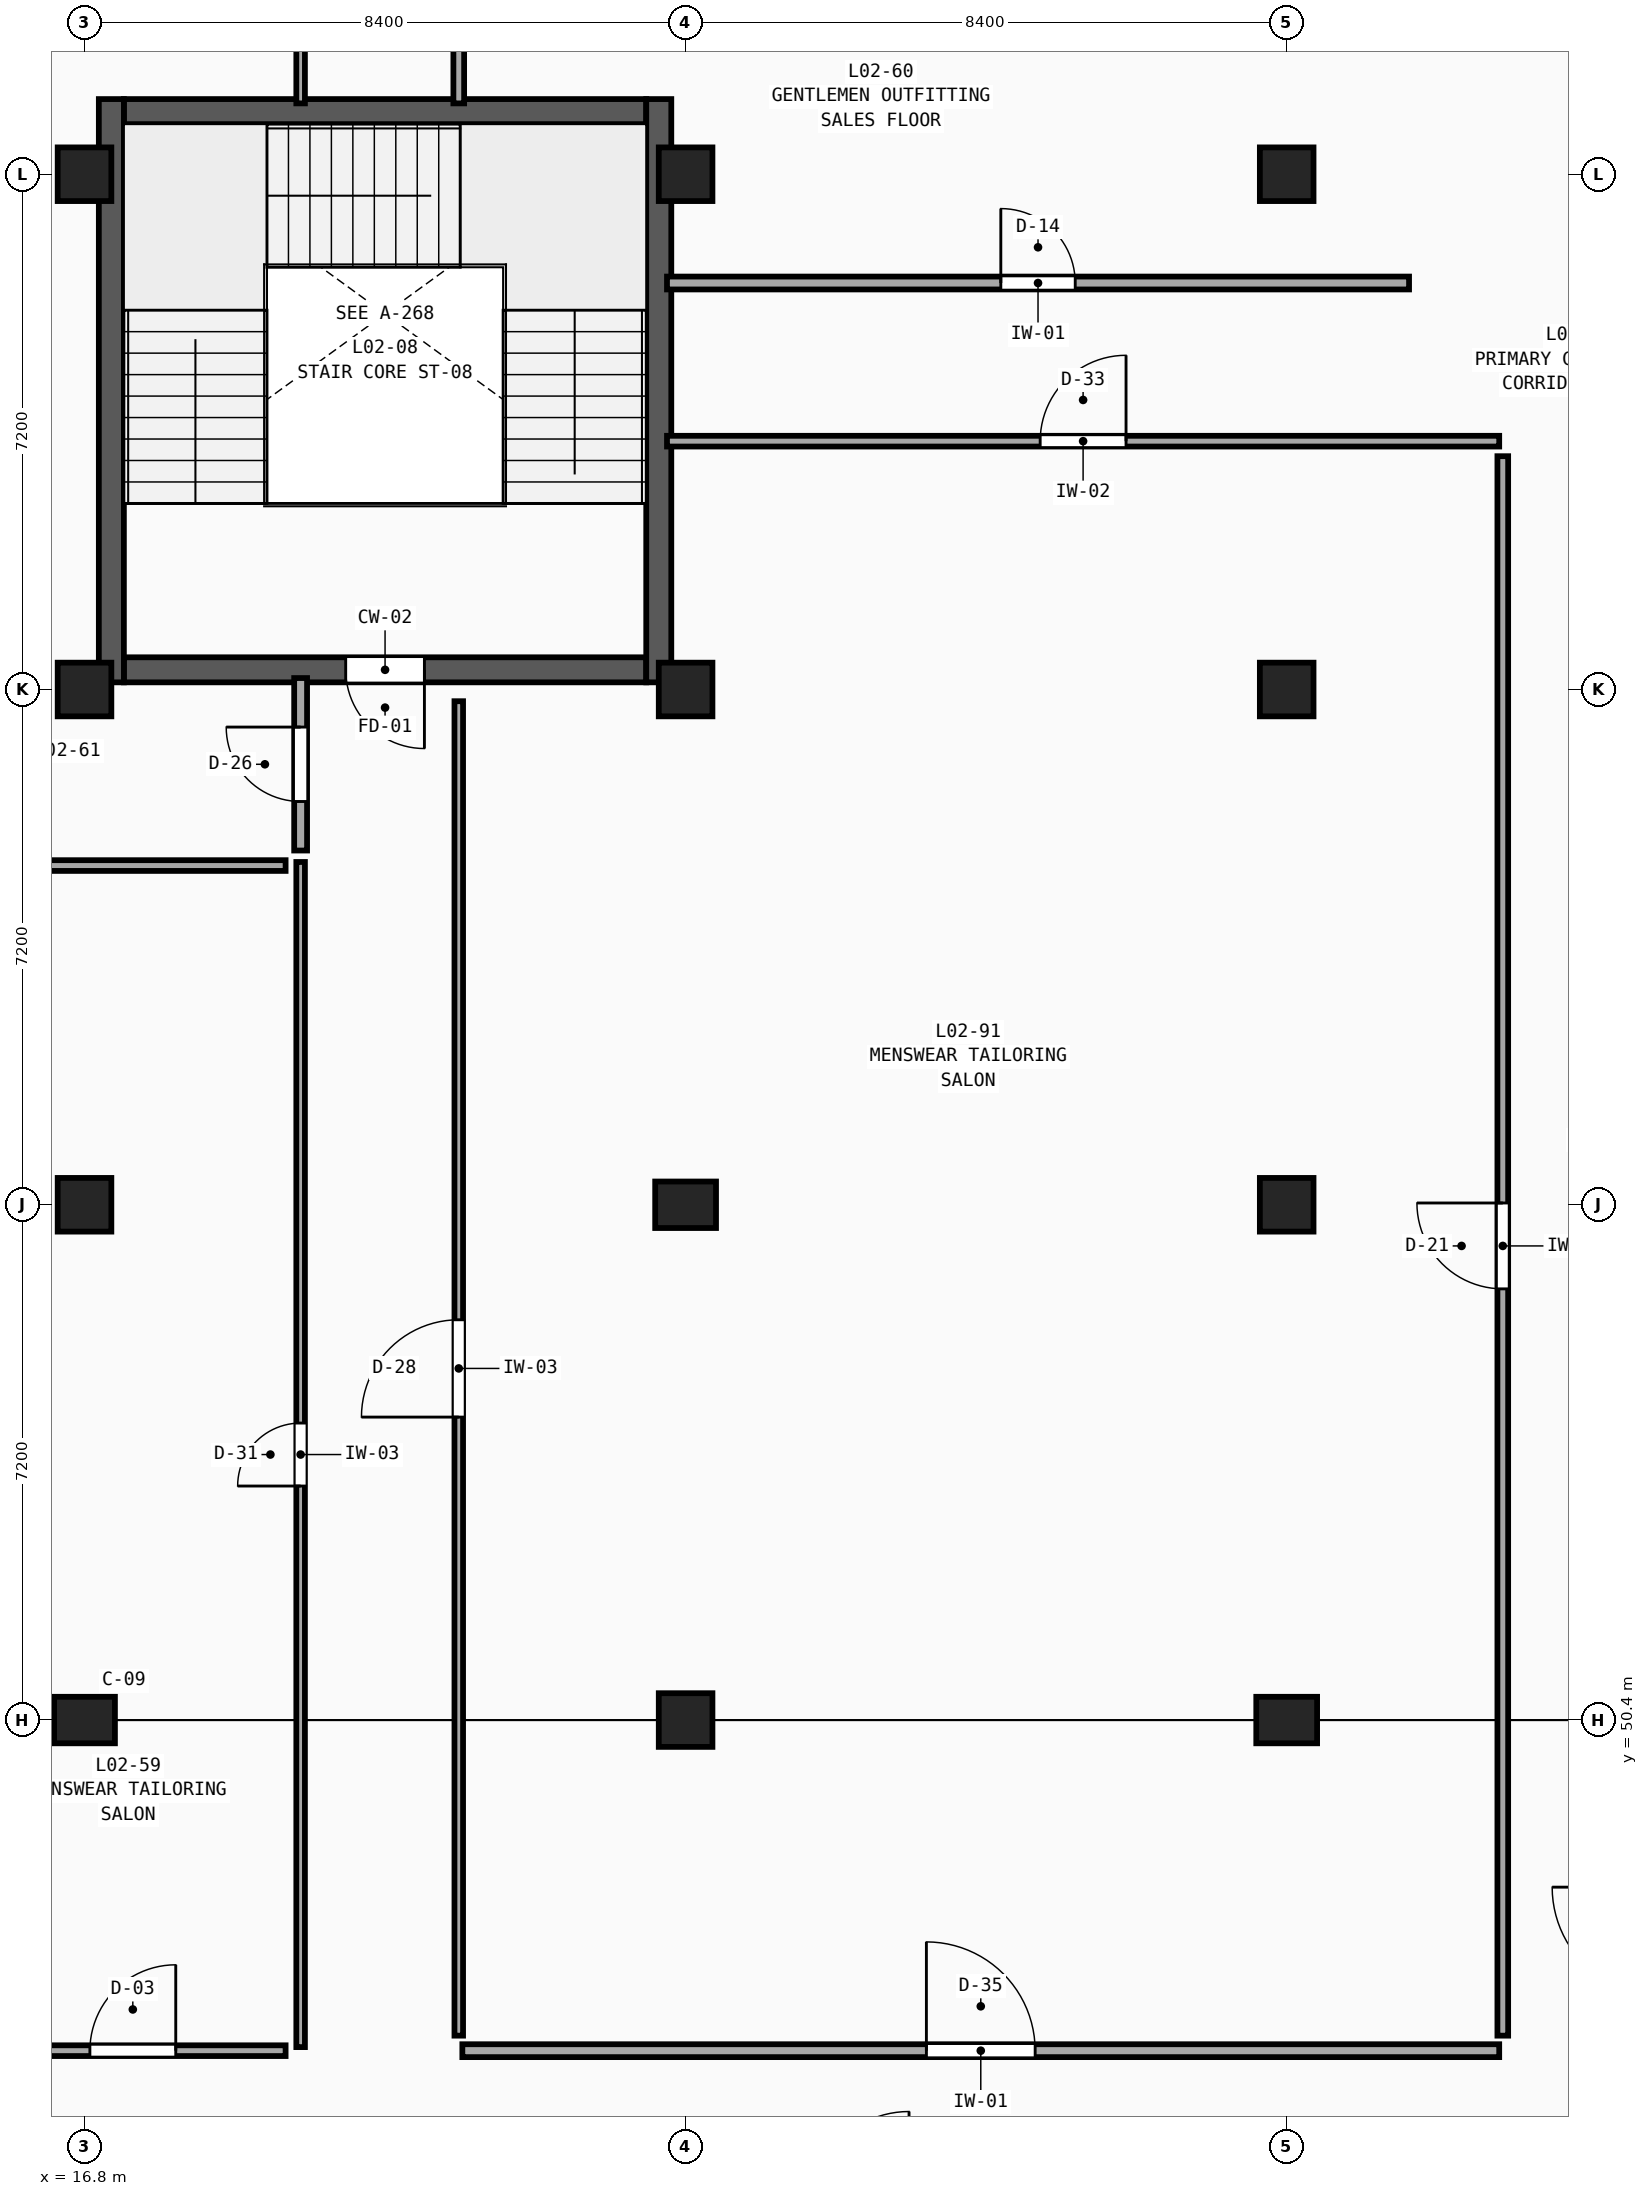
"""IFC4 building model, lengths in metres.
Left out: names, types, materials, properties, quantities, classifications, styles, units other than length and angle.
Written with IfcOpenShell. Run it as: python <this file> out.ifc"""

import sys

from ifc_helpers import new_model, si_unit, direction, frame, frame_2d, origin, origin_2d, place, context, subcontext, project, spatial, rectangle, extrude, element, fill, save


model = new_model("IFC4")
c1 = context("Model", 3, precision=1e-05, world=origin(), true_north=direction((0.0, 1.0)))
c2 = subcontext(c1, "Body", "Model", "MODEL_VIEW")
j1 = project(units=[si_unit("LENGTHUNIT", "METRE"), si_unit("PLANEANGLEUNIT", "RADIAN")], contexts=[c1])
p1 = place(None, origin())
s1 = spatial("IfcSite", under=j1, at=p1, CompositionType="ELEMENT")
p2 = place(p1, origin())
s2 = spatial("IfcBuilding", under=s1, at=p2, CompositionType="ELEMENT")
p3 = place(p2, frame((0.0, 0.0, 9.9)))
s3 = spatial("IfcBuildingStorey", under=s2, at=p3, CompositionType="ELEMENT", Elevation=9.9)
p4 = place(p3, frame((16.8, 50.4, 0.0), z_axis=(0.0, 0.0, 1.0), x_axis=(1.0, 0.0, 0.0)))
e1 = element("IfcColumn", 1, at=p4, inside=s3, PredefinedType="COLUMN", context=c2, shape_type="SweptSolid", body=[
    extrude(rectangle(XDim=0.85, YDim=0.65, at=origin_2d()), origin(), (0.0, 0.0, 1.0), 4.5),
])
for number, where, z_axis, x_axis in (
    (2, (16.8, 57.6, 0.0), (0.0, 0.0, 1.0), (1.0, 0.0, 0.0)),
    (3, (16.8, 64.8, 0.0), (0.0, 0.0, 1.0), (1.0, 0.0, 0.0)),
    (4, (16.8, 72.0, 0.0), (0.0, 0.0, 1.0), (1.0, 0.0, 0.0)),
    (5, (25.2, 50.4, 0.0), (0.0, 0.0, 1.0), (1.0, 0.0, 0.0)),
):
    element("IfcColumn", number, at=place(p3, frame(where, z_axis=z_axis, x_axis=x_axis)), inside=s3, PredefinedType="COLUMN", context=c2, shape_type="SweptSolid", body=[
        extrude(rectangle(XDim=0.75, YDim=0.75, at=origin_2d()), origin(), (0.0, 0.0, 1.0), 4.5),
    ])
p5 = place(p3, frame((25.2, 57.6, 0.0), z_axis=(0.0, 0.0, 1.0), x_axis=(1.0, 0.0, 0.0)))
e6 = element("IfcColumn", 6, at=p5, inside=s3, PredefinedType="COLUMN", context=c2, shape_type="SweptSolid", body=[
    extrude(rectangle(XDim=0.85, YDim=0.65, at=origin_2d()), origin(), (0.0, 0.0, 1.0), 4.5),
])
for number, where, z_axis, x_axis in (
    (7, (25.2, 64.8, 0.0), (0.0, 0.0, 1.0), (1.0, 0.0, 0.0)),
    (8, (25.2, 72.0, 0.0), (0.0, 0.0, 1.0), (1.0, 0.0, 0.0)),
):
    element("IfcColumn", number, at=place(p3, frame(where, z_axis=z_axis, x_axis=x_axis)), inside=s3, PredefinedType="COLUMN", context=c2, shape_type="SweptSolid", body=[
        extrude(rectangle(XDim=0.75, YDim=0.75, at=origin_2d()), origin(), (0.0, 0.0, 1.0), 4.5),
    ])
p6 = place(p3, frame((33.6, 50.4, 0.0), z_axis=(0.0, 0.0, 1.0), x_axis=(1.0, 0.0, 0.0)))
e9 = element("IfcColumn", 9, at=p6, inside=s3, PredefinedType="COLUMN", context=c2, shape_type="SweptSolid", body=[
    extrude(rectangle(XDim=0.85, YDim=0.65, at=origin_2d()), origin(), (0.0, 0.0, 1.0), 4.5),
])
for number, where, z_axis, x_axis in (
    (10, (33.6, 57.6, 0.0), (0.0, 0.0, 1.0), (1.0, 0.0, 0.0)),
    (11, (33.6, 64.8, 0.0), (0.0, 0.0, 1.0), (1.0, 0.0, 0.0)),
    (12, (33.6, 72.0, 0.0), (0.0, 0.0, 1.0), (1.0, 0.0, 0.0)),
):
    element("IfcColumn", number, at=place(p3, frame(where, z_axis=z_axis, x_axis=x_axis)), inside=s3, PredefinedType="COLUMN", context=c2, shape_type="SweptSolid", body=[
        extrude(rectangle(XDim=0.75, YDim=0.75, at=origin_2d()), origin(), (0.0, 0.0, 1.0), 4.5),
    ])
p7 = place(p3, frame((24.65, 65.075, 0.0), z_axis=(0.0, 0.0, 1.0), x_axis=(-1.0, 0.0, 0.0)))
e13 = element("IfcWall", 13, at=p7, inside=s3, PredefinedType="SHEAR", context=c2, shape_type="SweptSolid", body=[
    extrude(rectangle(XDim=7.3, YDim=0.35, at=frame_2d((3.65, 0.0))), origin(), (0.0, 0.0, 1.0), 4.5),
])
p8 = place(p7, frame((3.1, 0.0, 0.0)))
e14 = element("IfcOpeningElement", 14, at=p8, cuts=e13, PredefinedType="OPENING", context=c2, shape_type="SweptSolid", body=[
    extrude(rectangle(XDim=1.1, YDim=2.2, at=frame_2d((0.55, 1.1))), frame((0.0, 0.195, 0.0), z_axis=(0.0, -1.0, 0.0), x_axis=(1.0, 0.0, 0.0)), (0.0, 0.0, 1.0), 0.39),
])
p9 = place(p3, frame((17.35, 72.875, 0.0), z_axis=(0.0, 0.0, 1.0), x_axis=(1.0, 0.0, 0.0)))
e15 = element("IfcWall", 15, at=p9, inside=s3, PredefinedType="SHEAR", context=c2, shape_type="SweptSolid", body=[
    extrude(rectangle(XDim=7.3, YDim=0.35, at=frame_2d((3.65, 0.0))), origin(), (0.0, 0.0, 1.0), 4.5),
])
for number, where, z_axis, x_axis in (
    (16, (17.175, 73.05, 0.0), (0.0, 0.0, 1.0), (0.0, -1.0, 0.0)),
    (17, (24.825, 64.9, 0.0), (0.0, 0.0, 1.0), (0.0, 1.0, 0.0)),
):
    element("IfcWall", number, at=place(p3, frame(where, z_axis=z_axis, x_axis=x_axis)), inside=s3, PredefinedType="SHEAR", context=c2, shape_type="SweptSolid", body=[
        extrude(rectangle(XDim=8.15, YDim=0.35, at=frame_2d((4.075, 0.0))), origin(), (0.0, 0.0, 1.0), 4.5),
    ])
p10 = place(p3, frame((36.62, 45.99, 0.0), z_axis=(0.0, 0.0, 1.0), x_axis=(0.0, 1.0, 0.0)))
e18 = element("IfcWall", 18, at=p10, inside=s3, PredefinedType="PARTITIONING", context=c2, shape_type="SweptSolid", body=[
    extrude(rectangle(XDim=22.07, YDim=0.15, at=frame_2d((11.035, 0.0))), origin(), (0.0, 0.0, 1.0), 4.18),
])
p11 = place(p10, frame((10.435, 0.0, 0.0)))
e19 = element("IfcOpeningElement", 19, at=p11, cuts=e18, PredefinedType="OPENING", context=c2, shape_type="SweptSolid", body=[
    extrude(rectangle(XDim=1.2, YDim=2.29, at=frame_2d((0.6, 1.145))), frame((0.0, 0.095, 0.0), z_axis=(0.0, -1.0, 0.0), x_axis=(1.0, 0.0, 0.0)), (0.0, 0.0, 1.0), 0.19),
])
p12 = place(p3, frame((22.03, 45.99, 0.0), z_axis=(0.0, 0.0, 1.0), x_axis=(0.0, 1.0, 0.0)))
e20 = element("IfcWall", 20, at=p12, inside=s3, PredefinedType="PARTITIONING", context=c2, shape_type="SweptSolid", body=[
    extrude(rectangle(XDim=18.646, YDim=0.12, at=frame_2d((9.323, 0.0))), origin(), (0.0, 0.0, 1.0), 4.18),
])
p13 = place(p12, frame((8.643, 0.0, 0.0)))
e21 = element("IfcOpeningElement", 21, at=p13, cuts=e20, PredefinedType="OPENING", context=c2, shape_type="SweptSolid", body=[
    extrude(rectangle(XDim=1.36, YDim=2.37, at=frame_2d((0.68, 1.185))), frame((0.0, 0.08, 0.0), z_axis=(0.0, -1.0, 0.0), x_axis=(1.0, 0.0, 0.0)), (0.0, 0.0, 1.0), 0.16),
])
p14 = place(p3, frame((19.82, 45.83, 0.0), z_axis=(0.0, 0.0, 1.0), x_axis=(0.0, 1.0, 0.0)))
e22 = element("IfcWall", 22, at=p14, inside=s3, PredefinedType="PARTITIONING", context=c2, shape_type="SweptSolid", body=[
    extrude(rectangle(XDim=16.56, YDim=0.12, at=frame_2d((8.28, 0.0))), origin(), (0.0, 0.0, 1.0), 4.18),
])
p15 = place(p14, frame((7.84, 0.0, 0.0)))
e23 = element("IfcOpeningElement", 23, at=p15, cuts=e22, PredefinedType="OPENING", context=c2, shape_type="SweptSolid", body=[
    extrude(rectangle(XDim=0.88, YDim=2.45, at=frame_2d((0.44, 1.225))), frame((0.0, 0.08, 0.0), z_axis=(0.0, -1.0, 0.0), x_axis=(1.0, 0.0, 0.0)), (0.0, 0.0, 1.0), 0.16),
])
p16 = place(p3, frame((22.08, 45.78, 0.0), z_axis=(0.0, 0.0, 1.0), x_axis=(1.0, 0.0, 0.0)))
e24 = element("IfcWall", 24, at=p16, inside=s3, PredefinedType="PARTITIONING", context=c2, shape_type="SweptSolid", body=[
    extrude(rectangle(XDim=14.49, YDim=0.18, at=frame_2d((7.245, 0.0))), origin(), (0.0, 0.0, 1.0), 4.18),
])
p17 = place(p16, frame((6.485, 0.0, 0.0)))
e25 = element("IfcOpeningElement", 25, at=p17, cuts=e24, PredefinedType="OPENING", context=c2, shape_type="SweptSolid", body=[
    extrude(rectangle(XDim=1.52, YDim=2.45, at=frame_2d((0.76, 1.225))), frame((0.0, 0.11, 0.0), z_axis=(0.0, -1.0, 0.0), x_axis=(1.0, 0.0, 0.0)), (0.0, 0.0, 1.0), 0.22),
])
p18 = place(p3, frame((24.94, 68.27, 0.0), z_axis=(0.0, 0.0, 1.0), x_axis=(1.0, 0.0, 0.0)))
e26 = element("IfcWall", 26, at=p18, inside=s3, PredefinedType="PARTITIONING", context=c2, shape_type="SweptSolid", body=[
    extrude(rectangle(XDim=11.63, YDim=0.15, at=frame_2d((5.815, 0.0))), origin(), (0.0, 0.0, 1.0), 4.18),
])
p19 = place(p18, frame((5.215, 0.0, 0.0)))
e27 = element("IfcOpeningElement", 27, at=p19, cuts=e26, PredefinedType="OPENING", context=c2, shape_type="SweptSolid", body=[
    extrude(rectangle(XDim=1.2, YDim=2.45, at=frame_2d((0.6, 1.225))), frame((0.0, 0.095, 0.0), z_axis=(0.0, -1.0, 0.0), x_axis=(1.0, 0.0, 0.0)), (0.0, 0.0, 1.0), 0.19),
])
p20 = place(p3, frame((24.94, 70.48, 0.0), z_axis=(0.0, 0.0, 1.0), x_axis=(1.0, 0.0, 0.0)))
e28 = element("IfcWall", 28, at=p20, inside=s3, PredefinedType="PARTITIONING", context=c2, shape_type="SweptSolid", body=[
    extrude(rectangle(XDim=10.37, YDim=0.18, at=frame_2d((5.185, 0.0))), origin(), (0.0, 0.0, 1.0), 4.18),
])
p21 = place(p20, frame((4.665, 0.0, 0.0)))
e29 = element("IfcOpeningElement", 29, at=p21, cuts=e28, PredefinedType="OPENING", context=c2, shape_type="SweptSolid", body=[
    extrude(rectangle(XDim=1.04, YDim=2.21, at=frame_2d((0.52, 1.105))), frame((0.0, 0.11, 0.0), z_axis=(0.0, -1.0, 0.0), x_axis=(1.0, 0.0, 0.0)), (0.0, 0.0, 1.0), 0.22),
])
p22 = place(p3, frame((15.34, 45.78, 0.0), z_axis=(0.0, 0.0, 1.0), x_axis=(1.0, 0.0, 0.0)))
e30 = element("IfcWall", 30, at=p22, inside=s3, PredefinedType="PARTITIONING", context=c2, shape_type="SweptSolid", body=[
    extrude(rectangle(XDim=4.27, YDim=0.15, at=frame_2d((2.135, 0.0))), origin(), (0.0, 0.0, 1.0), 4.18),
])
p23 = place(p22, frame((1.535, 0.0, 0.0)))
e31 = element("IfcOpeningElement", 31, at=p23, cuts=e30, PredefinedType="OPENING", context=c2, shape_type="SweptSolid", body=[
    extrude(rectangle(XDim=1.2, YDim=2.05, at=frame_2d((0.6, 1.025))), frame((0.0, 0.095, 0.0), z_axis=(0.0, -1.0, 0.0), x_axis=(1.0, 0.0, 0.0)), (0.0, 0.0, 1.0), 0.19),
])
p24 = place(p3, frame((22.03, 72.99, 0.0), z_axis=(0.0, 0.0, 1.0), x_axis=(0.0, 1.0, 0.0)))
e32 = element("IfcWall", 32, at=p24, inside=s3, PredefinedType="PARTITIONING", context=c2, shape_type="SweptSolid", body=[
    extrude(rectangle(XDim=2.483, YDim=0.15, at=frame_2d((1.241, 0.0))), origin(), (0.0, 0.0, 1.0), 4.18),
])
p25 = place(p3, frame((19.82, 72.99, 0.0), z_axis=(0.0, 0.0, 1.0), x_axis=(0.0, 1.0, 0.0)))
e33 = element("IfcWall", 33, at=p25, inside=s3, PredefinedType="PARTITIONING", context=c2, shape_type="SweptSolid", body=[
    extrude(rectangle(XDim=2.483, YDim=0.12, at=frame_2d((1.241, 0.0))), origin(), (0.0, 0.0, 1.0), 4.18),
])
p26 = place(p25, frame((1.186, 0.0, 0.0)))
e34 = element("IfcOpeningElement", 34, at=p26, cuts=e33, PredefinedType="OPENING", context=c2, shape_type="SweptSolid", body=[
    extrude(rectangle(XDim=0.88, YDim=2.37, at=frame_2d((0.44, 1.185))), frame((0.0, 0.08, 0.0), z_axis=(0.0, -1.0, 0.0), x_axis=(1.0, 0.0, 0.0)), (0.0, 0.0, 1.0), 0.16),
])
p27 = place(p3, frame((19.82, 62.55, 0.0), z_axis=(0.0, 0.0, 1.0), x_axis=(0.0, 1.0, 0.0)))
e35 = element("IfcWall", 35, at=p27, inside=s3, PredefinedType="PARTITIONING", context=c2, shape_type="SweptSolid", body=[
    extrude(rectangle(XDim=2.41, YDim=0.18, at=frame_2d((1.205, 0.0))), origin(), (0.0, 0.0, 1.0), 4.18),
])
p28 = place(p27, frame((0.685, 0.0, 0.0)))
e36 = element("IfcOpeningElement", 36, at=p28, cuts=e35, PredefinedType="OPENING", context=c2, shape_type="SweptSolid", body=[
    extrude(rectangle(XDim=1.04, YDim=2.37, at=frame_2d((0.52, 1.185))), frame((0.0, 0.11, 0.0), z_axis=(0.0, -1.0, 0.0), x_axis=(1.0, 0.0, 0.0)), (0.0, 0.0, 1.0), 0.22),
])
p29 = place(p3, frame((15.34, 62.34, 0.0), z_axis=(0.0, 0.0, 1.0), x_axis=(1.0, 0.0, 0.0)))
e37 = element("IfcWall", 37, at=p29, inside=s3, PredefinedType="PARTITIONING", context=c2, shape_type="SweptSolid", body=[
    extrude(rectangle(XDim=4.27, YDim=0.15, at=frame_2d((2.135, 0.0))), origin(), (0.0, 0.0, 1.0), 4.18),
])
p30 = place(p8, origin())
e38 = element("IfcDoor", 38, at=p30, inside=s3, OperationType="SINGLE_SWING_LEFT", PredefinedType="DOOR", context=c2, shape_type="SweptSolid", body=[
    extrude(rectangle(XDim=1.1, YDim=2.2, at=frame_2d((0.55, 1.1))), frame((0.0, 0.025, 0.0), z_axis=(0.0, -1.0, 0.0), x_axis=(1.0, 0.0, 0.0)), (0.0, 0.0, 1.0), 0.05),
])
fill(e14, e38)
p31 = place(p11, origin())
e39 = element("IfcDoor", 39, at=p31, inside=s3, OperationType="SINGLE_SWING_RIGHT", PredefinedType="DOOR", context=c2, shape_type="SweptSolid", body=[
    extrude(rectangle(XDim=1.2, YDim=2.29, at=frame_2d((0.6, 1.145))), frame((0.0, 0.025, 0.0), z_axis=(0.0, -1.0, 0.0), x_axis=(1.0, 0.0, 0.0)), (0.0, 0.0, 1.0), 0.05),
])
fill(e19, e39)
p32 = place(p13, origin())
e40 = element("IfcDoor", 40, at=p32, inside=s3, OperationType="SINGLE_SWING_LEFT", PredefinedType="DOOR", context=c2, shape_type="SweptSolid", body=[
    extrude(rectangle(XDim=1.36, YDim=2.37, at=frame_2d((0.68, 1.185))), frame((0.0, 0.025, 0.0), z_axis=(0.0, -1.0, 0.0), x_axis=(1.0, 0.0, 0.0)), (0.0, 0.0, 1.0), 0.05),
])
fill(e21, e40)
p33 = place(p15, origin())
e41 = element("IfcDoor", 41, at=p33, inside=s3, OperationType="SINGLE_SWING_LEFT", PredefinedType="DOOR", context=c2, shape_type="SweptSolid", body=[
    extrude(rectangle(XDim=0.88, YDim=2.45, at=frame_2d((0.44, 1.225))), frame((0.0, 0.025, 0.0), z_axis=(0.0, -1.0, 0.0), x_axis=(1.0, 0.0, 0.0)), (0.0, 0.0, 1.0), 0.05),
])
fill(e23, e41)
p34 = place(p17, origin())
e42 = element("IfcDoor", 42, at=p34, inside=s3, OperationType="SINGLE_SWING_LEFT", PredefinedType="DOOR", context=c2, shape_type="SweptSolid", body=[
    extrude(rectangle(XDim=1.52, YDim=2.45, at=frame_2d((0.76, 1.225))), frame((0.0, 0.025, 0.0), z_axis=(0.0, -1.0, 0.0), x_axis=(1.0, 0.0, 0.0)), (0.0, 0.0, 1.0), 0.05),
])
fill(e25, e42)
p35 = place(p19, origin())
e43 = element("IfcDoor", 43, at=p35, inside=s3, OperationType="SINGLE_SWING_RIGHT", PredefinedType="DOOR", context=c2, shape_type="SweptSolid", body=[
    extrude(rectangle(XDim=1.2, YDim=2.45, at=frame_2d((0.6, 1.225))), frame((0.0, 0.025, 0.0), z_axis=(0.0, -1.0, 0.0), x_axis=(1.0, 0.0, 0.0)), (0.0, 0.0, 1.0), 0.05),
])
fill(e27, e43)
p36 = place(p21, origin())
e44 = element("IfcDoor", 44, at=p36, inside=s3, OperationType="SINGLE_SWING_LEFT", PredefinedType="DOOR", context=c2, shape_type="SweptSolid", body=[
    extrude(rectangle(XDim=1.04, YDim=2.21, at=frame_2d((0.52, 1.105))), frame((0.0, 0.025, 0.0), z_axis=(0.0, -1.0, 0.0), x_axis=(1.0, 0.0, 0.0)), (0.0, 0.0, 1.0), 0.05),
])
fill(e29, e44)
p37 = place(p23, origin())
e45 = element("IfcDoor", 45, at=p37, inside=s3, OperationType="SINGLE_SWING_RIGHT", PredefinedType="DOOR", context=c2, shape_type="SweptSolid", body=[
    extrude(rectangle(XDim=1.2, YDim=2.05, at=frame_2d((0.6, 1.025))), frame((0.0, 0.025, 0.0), z_axis=(0.0, -1.0, 0.0), x_axis=(1.0, 0.0, 0.0)), (0.0, 0.0, 1.0), 0.05),
])
fill(e31, e45)
p38 = place(p28, origin())
e46 = element("IfcDoor", 46, at=p38, inside=s3, OperationType="SINGLE_SWING_RIGHT", PredefinedType="DOOR", context=c2, shape_type="SweptSolid", body=[
    extrude(rectangle(XDim=1.04, YDim=2.37, at=frame_2d((0.52, 1.185))), frame((0.0, 0.025, 0.0), z_axis=(0.0, -1.0, 0.0), x_axis=(1.0, 0.0, 0.0)), (0.0, 0.0, 1.0), 0.05),
])
fill(e36, e46)
save(model, sys.argv[1])
